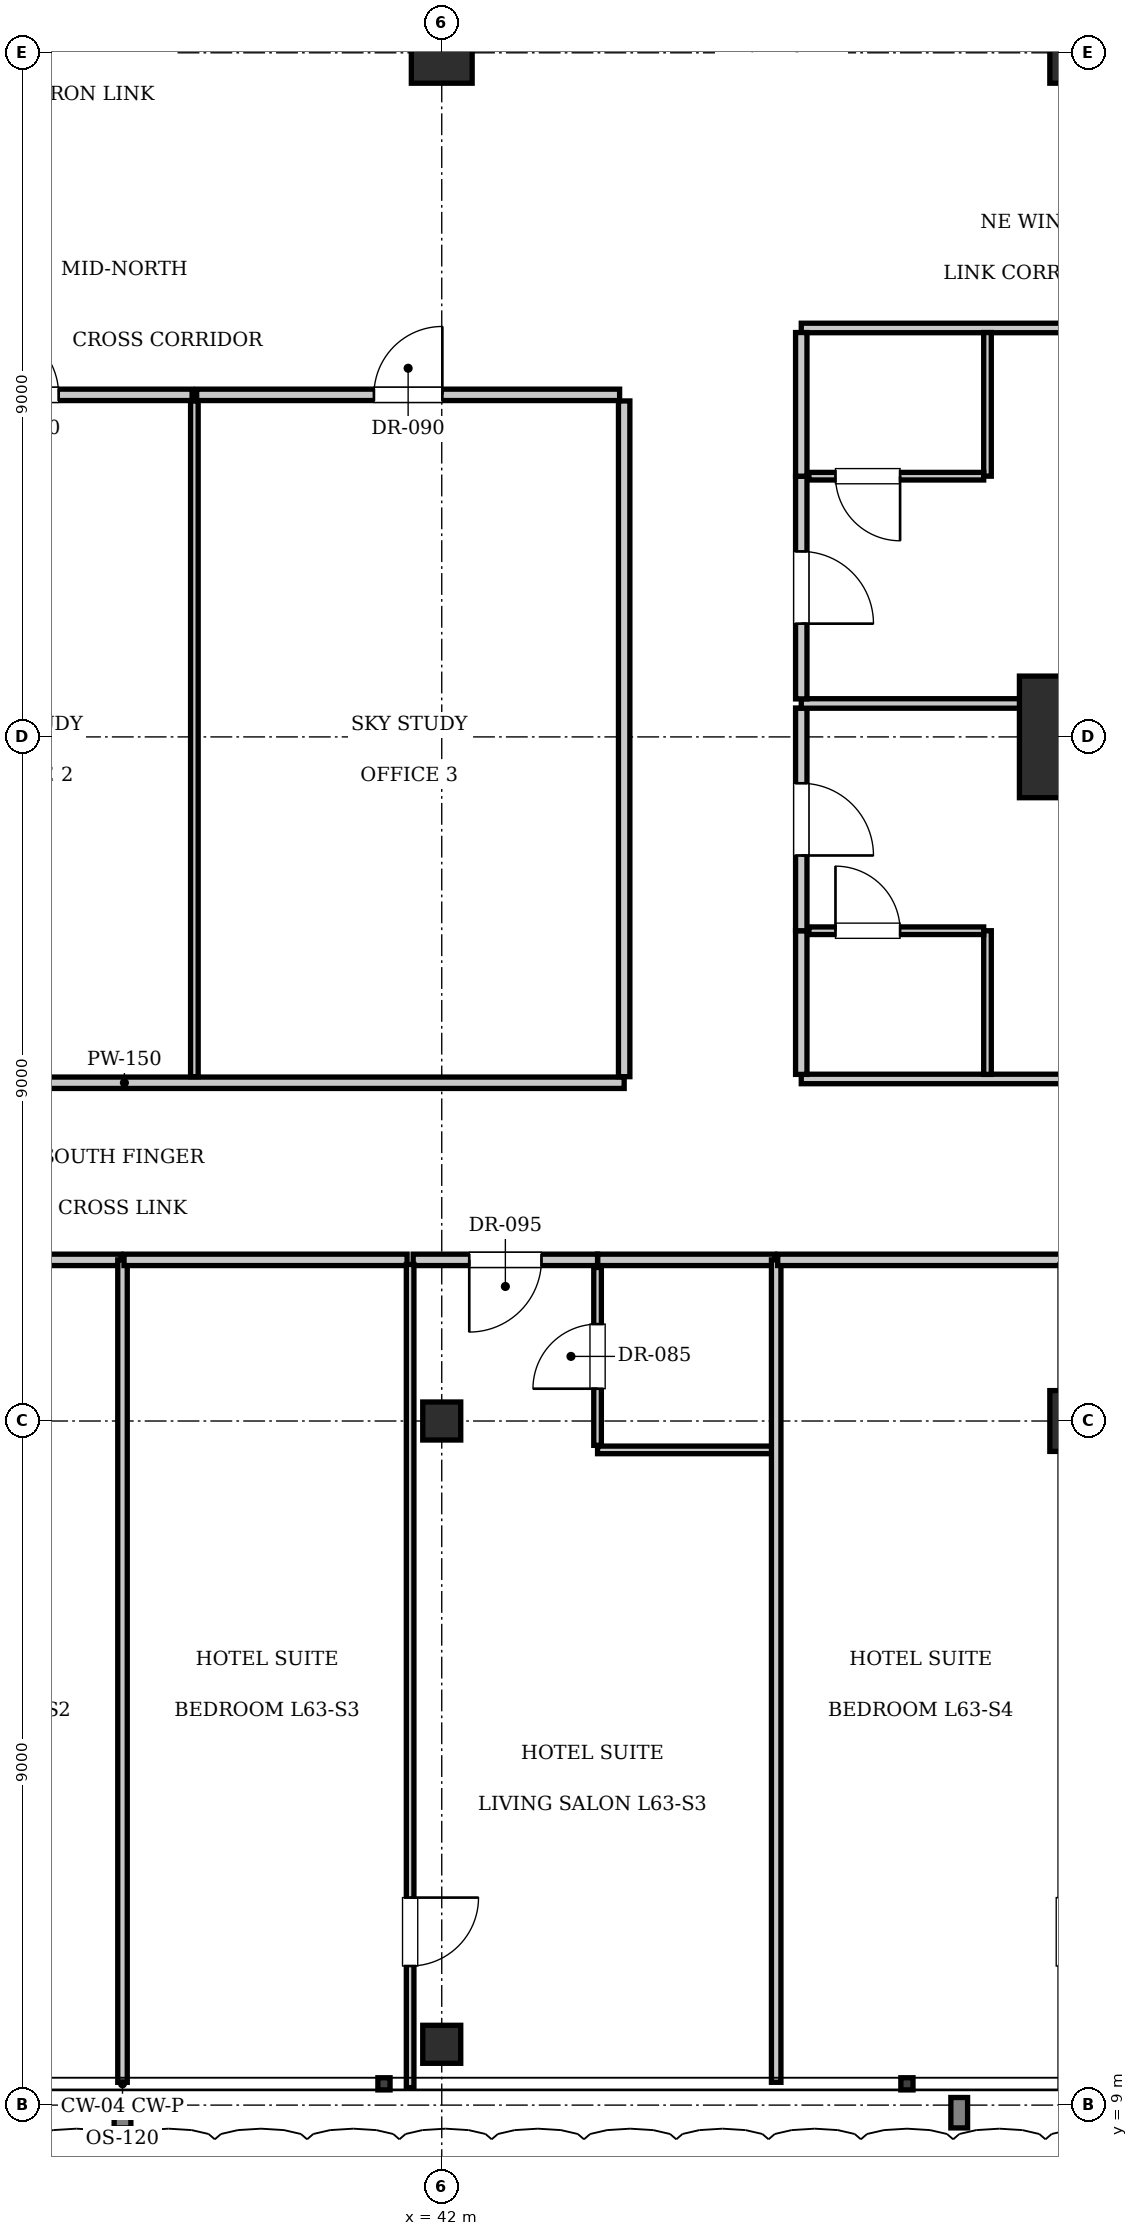
"""IFC4 building model, lengths in metres.
Left out: names, types, materials, properties, quantities, classifications, styles, units other than length and angle.
Written with IfcOpenShell. Run it as: python <this file> out.ifc"""

import sys

from ifc_helpers import new_model, si_unit, direction, frame, frame_2d, origin, origin_2d, place, context, subcontext, project, spatial, rectangle, i_section, extrude, element, fill, save


model = new_model("IFC4")
c1 = context("Model", 3, precision=1e-05, world=origin(), true_north=direction((0.0, 1.0)))
c2 = subcontext(c1, "Body", "Model", "MODEL_VIEW")
j1 = project(units=[si_unit("LENGTHUNIT", "METRE"), si_unit("PLANEANGLEUNIT", "RADIAN")], contexts=[c1])
p1 = place(None, origin())
s1 = spatial("IfcSite", under=j1, at=p1, CompositionType="ELEMENT")
p2 = place(p1, origin())
s2 = spatial("IfcBuilding", under=s1, at=p2, CompositionType="ELEMENT")
p3 = place(p2, frame((0.0, 0.0, 258.65)))
s3 = spatial("IfcBuildingStorey", under=s2, at=p3, CompositionType="ELEMENT", Elevation=258.65)
p4 = place(p3, frame((50.4, 27.0, 0.0), z_axis=(0.0, 0.0, 1.0), x_axis=(1.0, 0.0, 0.0)))
e1 = element("IfcColumn", 1, at=p4, inside=s3, PredefinedType="COLUMN", context=c2, shape_type="SweptSolid", body=[
    extrude(rectangle(XDim=1.6, YDim=1.6, at=origin_2d()), origin(), (0.0, 0.0, 1.0), 3.85),
])
for number, where, z_axis, x_axis in (
    (2, (42.0, 36.0, 0.0), (0.0, 0.0, 1.0), (1.0, 0.0, 0.0)),
    (3, (50.4, 36.0, 0.0), (0.0, 0.0, 1.0), (1.0, 0.0, 0.0)),
    (4, (50.4, 18.0, 0.0), (0.0, 0.0, 1.0), (1.0, 0.0, 0.0)),
):
    element("IfcColumn", number, at=place(p3, frame(where, z_axis=z_axis, x_axis=x_axis)), inside=s3, PredefinedType="COLUMN", context=c2, shape_type="SweptSolid", body=[
        extrude(rectangle(XDim=0.8, YDim=0.8, at=origin_2d()), origin(), (0.0, 0.0, 1.0), 3.85),
    ])
for number, where, z_axis, x_axis in (
    (5, (42.0, 18.0, 0.0), (0.0, 0.0, 1.0), (1.0, 0.0, 0.0)),
    (6, (42.0, 9.8, 0.0), (0.0, 0.0, 1.0), (1.0, 0.0, 0.0)),
):
    element("IfcColumn", number, at=place(p3, frame(where, z_axis=z_axis, x_axis=x_axis)), inside=s3, PredefinedType="COLUMN", context=c2, shape_type="SweptSolid", body=[
        extrude(i_section(OverallWidth=0.5, OverallDepth=0.5, WebThickness=0.022, FlangeThickness=0.032, at=origin_2d()), origin(), (0.0, 0.0, 1.0), 3.85),
    ])
p5 = place(p3, frame((31.25, 22.45, 0.0), z_axis=(0.0, 0.0, 1.0), x_axis=(1.0, 0.0, 0.0)))
e7 = element("IfcWall", 7, at=p5, inside=s3, PredefinedType="PARTITIONING", context=c2, shape_type="SweptSolid", body=[
    extrude(rectangle(XDim=13.15, YDim=0.15, at=frame_2d((6.575, 0.0))), origin(), (0.0, 0.0, 1.0), 3.61),
])
p6 = place(p3, frame((44.4, 22.53, 0.0), z_axis=(0.0, 0.0, 1.0), x_axis=(0.0, 1.0, 0.0)))
e8 = element("IfcWall", 8, at=p6, inside=s3, PredefinedType="PARTITIONING", context=c2, shape_type="SweptSolid", body=[
    extrude(rectangle(XDim=8.89, YDim=0.15, at=frame_2d((4.445, 0.0))), origin(), (0.0, 0.0, 1.0), 3.61),
])
p7 = place(p3, frame((34.304, 31.5, 0.0), z_axis=(0.0, 0.0, 1.0), x_axis=(1.0, 0.0, 0.0)))
e9 = element("IfcWall", 9, at=p7, inside=s3, PredefinedType="PARTITIONING", context=c2, shape_type="SweptSolid", body=[
    extrude(rectangle(XDim=4.411, YDim=0.15, at=frame_2d((2.206, 0.0))), origin(), (0.0, 0.0, 1.0), 3.61),
])
p8 = place(p7, frame((1.756, 0.0, 0.0)))
e10 = element("IfcOpeningElement", 10, at=p8, cuts=e9, PredefinedType="OPENING", context=c2, shape_type="SweptSolid", body=[
    extrude(rectangle(XDim=0.9, YDim=2.1, at=frame_2d((0.45, 1.05))), frame((0.0, 0.085, 0.0), z_axis=(0.0, -1.0, 0.0), x_axis=(1.0, 0.0, 0.0)), (0.0, 0.0, 1.0), 0.17),
])
p9 = place(p3, frame((38.746, 22.53, 0.0), z_axis=(0.0, 0.0, 1.0), x_axis=(0.0, 1.0, 0.0)))
e11 = element("IfcWall", 11, at=p9, inside=s3, PredefinedType="PARTITIONING", context=c2, shape_type="SweptSolid", body=[
    extrude(rectangle(XDim=8.89, YDim=0.1, at=frame_2d((4.445, 0.0))), origin(), (0.0, 0.0, 1.0), 3.61),
])
p10 = place(p3, frame((38.775, 31.5, 0.0), z_axis=(0.0, 0.0, 1.0), x_axis=(1.0, 0.0, 0.0)))
e12 = element("IfcWall", 12, at=p10, inside=s3, PredefinedType="PARTITIONING", context=c2, shape_type="SweptSolid", body=[
    extrude(rectangle(XDim=5.565, YDim=0.15, at=frame_2d((2.782, 0.0))), origin(), (0.0, 0.0, 1.0), 3.61),
])
p11 = place(p10, frame((2.332, 0.0, 0.0)))
e13 = element("IfcOpeningElement", 13, at=p11, cuts=e12, PredefinedType="OPENING", context=c2, shape_type="SweptSolid", body=[
    extrude(rectangle(XDim=0.9, YDim=2.1, at=frame_2d((0.45, 1.05))), frame((0.0, 0.085, 0.0), z_axis=(0.0, -1.0, 0.0), x_axis=(1.0, 0.0, 0.0)), (0.0, 0.0, 1.0), 0.17),
])
p12 = place(p3, frame((34.056, 20.12, 0.0), z_axis=(0.0, 0.0, 1.0), x_axis=(1.0, 0.0, 0.0)))
e14 = element("IfcWall", 14, at=p12, inside=s3, PredefinedType="PARTITIONING", context=c2, shape_type="SweptSolid", body=[
    extrude(rectangle(XDim=3.724, YDim=0.15, at=frame_2d((1.862, 0.0))), origin(), (0.0, 0.0, 1.0), 3.61),
])
p13 = place(p3, frame((37.8, 9.3, 0.0), z_axis=(0.0, 0.0, 1.0), x_axis=(0.0, 1.0, 0.0)))
e15 = element("IfcWall", 15, at=p13, inside=s3, PredefinedType="PARTITIONING", context=c2, shape_type="SweptSolid", body=[
    extrude(rectangle(XDim=10.82, YDim=0.125, at=frame_2d((5.41, 0.0))), origin(), (0.0, 0.0, 1.0), 3.457),
])
p14 = place(p3, frame((44.05, 20.12, 0.0), z_axis=(0.0, 0.0, 1.0), x_axis=(1.0, 0.0, 0.0)))
e16 = element("IfcWall", 16, at=p14, inside=s3, PredefinedType="PARTITIONING", context=c2, shape_type="SweptSolid", body=[
    extrude(rectangle(XDim=2.33, YDim=0.15, at=frame_2d((1.165, 0.0))), origin(), (0.0, 0.0, 1.0), 3.61),
])
p15 = place(p3, frame((44.05, 17.62, 0.0), z_axis=(0.0, 0.0, 1.0), x_axis=(1.0, 0.0, 0.0)))
e17 = element("IfcWall", 17, at=p15, inside=s3, PredefinedType="PARTITIONING", context=c2, shape_type="SweptSolid", body=[
    extrude(rectangle(XDim=2.31, YDim=0.1, at=frame_2d((1.155, 0.0))), origin(), (0.0, 0.0, 1.0), 3.61),
])
p16 = place(p3, frame((44.05, 17.68, 0.0), z_axis=(0.0, 0.0, 1.0), x_axis=(0.0, 1.0, 0.0)))
e18 = element("IfcWall", 18, at=p16, inside=s3, PredefinedType="PARTITIONING", context=c2, shape_type="SweptSolid", body=[
    extrude(rectangle(XDim=2.34, YDim=0.1, at=frame_2d((1.17, 0.0))), origin(), (0.0, 0.0, 1.0), 3.61),
])
p17 = place(p16, frame((0.745, 0.0, 0.0)))
e19 = element("IfcOpeningElement", 19, at=p17, cuts=e18, PredefinedType="OPENING", context=c2, shape_type="SweptSolid", body=[
    extrude(rectangle(XDim=0.85, YDim=2.1, at=frame_2d((0.425, 1.05))), frame((0.0, 0.06, 0.0), z_axis=(0.0, -1.0, 0.0), x_axis=(1.0, 0.0, 0.0)), (0.0, 0.0, 1.0), 0.12),
])
p18 = place(p3, frame((37.82, 20.12, 0.0), z_axis=(0.0, 0.0, 1.0), x_axis=(1.0, 0.0, 0.0)))
e20 = element("IfcWall", 20, at=p18, inside=s3, PredefinedType="PARTITIONING", context=c2, shape_type="SweptSolid", body=[
    extrude(rectangle(XDim=3.724, YDim=0.15, at=frame_2d((1.862, 0.0))), origin(), (0.0, 0.0, 1.0), 3.61),
])
p19 = place(p3, frame((41.624, 20.12, 0.0), z_axis=(0.0, 0.0, 1.0), x_axis=(1.0, 0.0, 0.0)))
e21 = element("IfcWall", 21, at=p19, inside=s3, PredefinedType="PARTITIONING", context=c2, shape_type="SweptSolid", body=[
    extrude(rectangle(XDim=2.426, YDim=0.15, at=frame_2d((1.213, 0.0))), origin(), (0.0, 0.0, 1.0), 3.61),
])
p20 = place(p19, frame((0.738, 0.0, 0.0)))
e22 = element("IfcOpeningElement", 22, at=p20, cuts=e21, PredefinedType="OPENING", context=c2, shape_type="SweptSolid", body=[
    extrude(rectangle(XDim=0.95, YDim=2.15, at=frame_2d((0.475, 1.075))), frame((0.0, 0.085, 0.0), z_axis=(0.0, -1.0, 0.0), x_axis=(1.0, 0.0, 0.0)), (0.0, 0.0, 1.0), 0.17),
])
p21 = place(p3, frame((41.584, 9.23, 0.0), z_axis=(0.0, 0.0, 1.0), x_axis=(0.0, 1.0, 0.0)))
e23 = element("IfcWall", 23, at=p21, inside=s3, PredefinedType="PARTITIONING", context=c2, shape_type="SweptSolid", body=[
    extrude(rectangle(XDim=10.83, YDim=0.1, at=frame_2d((5.415, 0.0))), origin(), (0.0, 0.0, 1.0), 3.61),
])
p22 = place(p21, frame((1.6, 0.0, 0.0)))
e24 = element("IfcOpeningElement", 24, at=p22, cuts=e23, PredefinedType="OPENING", context=c2, shape_type="SweptSolid", body=[
    extrude(rectangle(XDim=0.9, YDim=2.1, at=frame_2d((0.45, 1.05))), frame((0.0, 0.06, 0.0), z_axis=(0.0, -1.0, 0.0), x_axis=(1.0, 0.0, 0.0)), (0.0, 0.0, 1.0), 0.12),
])
p23 = place(p3, frame((46.4, 9.3, 0.0), z_axis=(0.0, 0.0, 1.0), x_axis=(0.0, 1.0, 0.0)))
e25 = element("IfcWall", 25, at=p23, inside=s3, PredefinedType="PARTITIONING", context=c2, shape_type="SweptSolid", body=[
    extrude(rectangle(XDim=10.82, YDim=0.125, at=frame_2d((5.41, 0.0))), origin(), (0.0, 0.0, 1.0), 3.61),
])
p24 = place(p3, frame((46.42, 20.12, 0.0), z_axis=(0.0, 0.0, 1.0), x_axis=(1.0, 0.0, 0.0)))
e26 = element("IfcWall", 26, at=p24, inside=s3, PredefinedType="PARTITIONING", context=c2, shape_type="SweptSolid", body=[
    extrude(rectangle(XDim=3.724, YDim=0.15, at=frame_2d((1.862, 0.0))), origin(), (0.0, 0.0, 1.0), 3.61),
])
for number, where, z_axis, x_axis in (
    (27, (46.73, 22.5, 0.0), (0.0, 0.0, 1.0), (1.0, 0.0, 0.0)),
    (28, (46.73, 32.38, 0.0), (0.0, 0.0, 1.0), (1.0, 0.0, 0.0)),
):
    element("IfcWall", number, at=place(p3, frame(where, z_axis=z_axis, x_axis=x_axis)), inside=s3, PredefinedType="PARTITIONING", context=c2, shape_type="SweptSolid", body=[
        extrude(rectangle(XDim=13.37, YDim=0.125, at=frame_2d((6.685, 0.0))), origin(), (0.0, 0.0, 1.0), 3.61),
    ])
p25 = place(p3, frame((46.73, 22.56, 0.0), z_axis=(0.0, 0.0, 1.0), x_axis=(0.0, 1.0, 0.0)))
e29 = element("IfcWall", 29, at=p25, inside=s3, PredefinedType="PARTITIONING", context=c2, shape_type="SweptSolid", body=[
    extrude(rectangle(XDim=1.89, YDim=0.15, at=frame_2d((0.945, 0.0))), origin(), (0.0, 0.0, 1.0), 3.61),
])
p26 = place(p3, frame((46.73, 24.45, 0.0), z_axis=(0.0, 0.0, 1.0), x_axis=(0.0, 1.0, 0.0)))
e30 = element("IfcWall", 30, at=p26, inside=s3, PredefinedType="PARTITIONING", context=c2, shape_type="SweptSolid", body=[
    extrude(rectangle(XDim=2.93, YDim=0.15, at=frame_2d((1.465, 0.0))), origin(), (0.0, 0.0, 1.0), 3.61),
])
p27 = place(p26, frame((0.99, 0.0, 0.0)))
e31 = element("IfcOpeningElement", 31, at=p27, cuts=e30, PredefinedType="OPENING", context=c2, shape_type="SweptSolid", body=[
    extrude(rectangle(XDim=0.95, YDim=2.15, at=frame_2d((0.475, 1.075))), frame((0.0, 0.085, 0.0), z_axis=(0.0, -1.0, 0.0), x_axis=(1.0, 0.0, 0.0)), (0.0, 0.0, 1.0), 0.17),
])
p28 = place(p3, frame((49.18, 22.56, 0.0), z_axis=(0.0, 0.0, 1.0), x_axis=(0.0, 1.0, 0.0)))
e32 = element("IfcWall", 32, at=p28, inside=s3, PredefinedType="PARTITIONING", context=c2, shape_type="SweptSolid", body=[
    extrude(rectangle(XDim=1.89, YDim=0.1, at=frame_2d((0.945, 0.0))), origin(), (0.0, 0.0, 1.0), 3.61),
])
p29 = place(p3, frame((46.83, 24.45, 0.0), z_axis=(0.0, 0.0, 1.0), x_axis=(1.0, 0.0, 0.0)))
e33 = element("IfcWall", 33, at=p29, inside=s3, PredefinedType="PARTITIONING", context=c2, shape_type="SweptSolid", body=[
    extrude(rectangle(XDim=2.3, YDim=0.1, at=frame_2d((1.15, 0.0))), origin(), (0.0, 0.0, 1.0), 3.61),
])
p30 = place(p29, frame((0.35, 0.0, 0.0)))
e34 = element("IfcOpeningElement", 34, at=p30, cuts=e33, PredefinedType="OPENING", context=c2, shape_type="SweptSolid", body=[
    extrude(rectangle(XDim=0.85, YDim=2.1, at=frame_2d((0.425, 1.05))), frame((0.0, 0.06, 0.0), z_axis=(0.0, -1.0, 0.0), x_axis=(1.0, 0.0, 0.0)), (0.0, 0.0, 1.0), 0.12),
])
p31 = place(p3, frame((46.73, 27.44, 0.0), z_axis=(0.0, 0.0, 1.0), x_axis=(1.0, 0.0, 0.0)))
e35 = element("IfcWall", 35, at=p31, inside=s3, PredefinedType="PARTITIONING", context=c2, shape_type="SweptSolid", body=[
    extrude(rectangle(XDim=13.37, YDim=0.125, at=frame_2d((6.685, 0.0))), origin(), (0.0, 0.0, 1.0), 3.61),
])
p32 = place(p3, frame((46.73, 27.5, 0.0), z_axis=(0.0, 0.0, 1.0), x_axis=(0.0, 1.0, 0.0)))
e36 = element("IfcWall", 36, at=p32, inside=s3, PredefinedType="PARTITIONING", context=c2, shape_type="SweptSolid", body=[
    extrude(rectangle(XDim=2.93, YDim=0.15, at=frame_2d((1.465, 0.0))), origin(), (0.0, 0.0, 1.0), 3.61),
])
p33 = place(p32, frame((0.99, 0.0, 0.0)))
e37 = element("IfcOpeningElement", 37, at=p33, cuts=e36, PredefinedType="OPENING", context=c2, shape_type="SweptSolid", body=[
    extrude(rectangle(XDim=0.95, YDim=2.15, at=frame_2d((0.475, 1.075))), frame((0.0, 0.085, 0.0), z_axis=(0.0, -1.0, 0.0), x_axis=(1.0, 0.0, 0.0)), (0.0, 0.0, 1.0), 0.17),
])
p34 = place(p3, frame((46.73, 30.43, 0.0), z_axis=(0.0, 0.0, 1.0), x_axis=(0.0, 1.0, 0.0)))
e38 = element("IfcWall", 38, at=p34, inside=s3, PredefinedType="PARTITIONING", context=c2, shape_type="SweptSolid", body=[
    extrude(rectangle(XDim=1.89, YDim=0.15, at=frame_2d((0.945, 0.0))), origin(), (0.0, 0.0, 1.0), 3.61),
])
p35 = place(p3, frame((49.18, 30.43, 0.0), z_axis=(0.0, 0.0, 1.0), x_axis=(0.0, 1.0, 0.0)))
e39 = element("IfcWall", 39, at=p35, inside=s3, PredefinedType="PARTITIONING", context=c2, shape_type="SweptSolid", body=[
    extrude(rectangle(XDim=1.89, YDim=0.1, at=frame_2d((0.945, 0.0))), origin(), (0.0, 0.0, 1.0), 3.61),
])
p36 = place(p3, frame((46.83, 30.43, 0.0), z_axis=(0.0, 0.0, 1.0), x_axis=(1.0, 0.0, 0.0)))
e40 = element("IfcWall", 40, at=p36, inside=s3, PredefinedType="PARTITIONING", context=c2, shape_type="SweptSolid", body=[
    extrude(rectangle(XDim=2.3, YDim=0.1, at=frame_2d((1.15, 0.0))), origin(), (0.0, 0.0, 1.0), 3.61),
])
p37 = place(p36, frame((0.35, 0.0, 0.0)))
e41 = element("IfcOpeningElement", 41, at=p37, cuts=e40, PredefinedType="OPENING", context=c2, shape_type="SweptSolid", body=[
    extrude(rectangle(XDim=0.85, YDim=2.1, at=frame_2d((0.425, 1.05))), frame((0.0, 0.06, 0.0), z_axis=(0.0, -1.0, 0.0), x_axis=(1.0, 0.0, 0.0)), (0.0, 0.0, 1.0), 0.12),
])
p38 = place(p8, origin())
e42 = element("IfcDoor", 42, at=p38, inside=s3, OperationType="SINGLE_SWING_LEFT", PredefinedType="DOOR", context=c2, shape_type="SweptSolid", body=[
    extrude(rectangle(XDim=0.9, YDim=2.1, at=frame_2d((0.45, 1.05))), frame((0.0, 0.025, 0.0), z_axis=(0.0, -1.0, 0.0), x_axis=(1.0, 0.0, 0.0)), (0.0, 0.0, 1.0), 0.05),
])
fill(e10, e42)
p39 = place(p11, origin())
e43 = element("IfcDoor", 43, at=p39, inside=s3, OperationType="SINGLE_SWING_RIGHT", PredefinedType="DOOR", context=c2, shape_type="SweptSolid", body=[
    extrude(rectangle(XDim=0.9, YDim=2.1, at=frame_2d((0.45, 1.05))), frame((0.0, 0.025, 0.0), z_axis=(0.0, -1.0, 0.0), x_axis=(1.0, 0.0, 0.0)), (0.0, 0.0, 1.0), 0.05),
])
fill(e13, e43)
p40 = place(p17, origin())
e44 = element("IfcDoor", 44, at=p40, inside=s3, OperationType="SINGLE_SWING_LEFT", PredefinedType="DOOR", context=c2, shape_type="SweptSolid", body=[
    extrude(rectangle(XDim=0.85, YDim=2.1, at=frame_2d((0.425, 1.05))), frame((0.0, 0.025, 0.0), z_axis=(0.0, -1.0, 0.0), x_axis=(1.0, 0.0, 0.0)), (0.0, 0.0, 1.0), 0.05),
])
fill(e19, e44)
p41 = place(p20, frame((0.95, 0.0, 0.0), z_axis=(0.0, 0.0, 1.0), x_axis=(-1.0, 0.0, 0.0)))
e45 = element("IfcDoor", 45, at=p41, inside=s3, OperationType="SINGLE_SWING_RIGHT", PredefinedType="DOOR", context=c2, shape_type="SweptSolid", body=[
    extrude(rectangle(XDim=0.95, YDim=2.15, at=frame_2d((0.475, 1.075))), frame((0.0, 0.025, 0.0), z_axis=(0.0, -1.0, 0.0), x_axis=(1.0, 0.0, 0.0)), (0.0, 0.0, 1.0), 0.05),
])
fill(e22, e45)
p42 = place(p22, frame((0.9, 0.0, 0.0), z_axis=(0.0, 0.0, 1.0), x_axis=(-1.0, 0.0, 0.0)))
e46 = element("IfcDoor", 46, at=p42, inside=s3, OperationType="SINGLE_SWING_LEFT", PredefinedType="DOOR", context=c2, shape_type="SweptSolid", body=[
    extrude(rectangle(XDim=0.9, YDim=2.1, at=frame_2d((0.45, 1.05))), frame((0.0, 0.025, 0.0), z_axis=(0.0, -1.0, 0.0), x_axis=(1.0, 0.0, 0.0)), (0.0, 0.0, 1.0), 0.05),
])
fill(e24, e46)
p43 = place(p30, origin())
e47 = element("IfcDoor", 47, at=p43, inside=s3, OperationType="SINGLE_SWING_LEFT", PredefinedType="DOOR", context=c2, shape_type="SweptSolid", body=[
    extrude(rectangle(XDim=0.85, YDim=2.1, at=frame_2d((0.425, 1.05))), frame((0.0, 0.025, 0.0), z_axis=(0.0, -1.0, 0.0), x_axis=(1.0, 0.0, 0.0)), (0.0, 0.0, 1.0), 0.05),
])
fill(e34, e47)
p44 = place(p27, frame((0.95, 0.0, 0.0), z_axis=(0.0, 0.0, 1.0), x_axis=(-1.0, 0.0, 0.0)))
e48 = element("IfcDoor", 48, at=p44, inside=s3, OperationType="SINGLE_SWING_RIGHT", PredefinedType="DOOR", context=c2, shape_type="SweptSolid", body=[
    extrude(rectangle(XDim=0.95, YDim=2.15, at=frame_2d((0.475, 1.075))), frame((0.0, 0.025, 0.0), z_axis=(0.0, -1.0, 0.0), x_axis=(1.0, 0.0, 0.0)), (0.0, 0.0, 1.0), 0.05),
])
fill(e31, e48)
p45 = place(p37, frame((0.85, 0.0, 0.0), z_axis=(0.0, 0.0, 1.0), x_axis=(-1.0, 0.0, 0.0)))
e49 = element("IfcDoor", 49, at=p45, inside=s3, OperationType="SINGLE_SWING_LEFT", PredefinedType="DOOR", context=c2, shape_type="SweptSolid", body=[
    extrude(rectangle(XDim=0.85, YDim=2.1, at=frame_2d((0.425, 1.05))), frame((0.0, 0.025, 0.0), z_axis=(0.0, -1.0, 0.0), x_axis=(1.0, 0.0, 0.0)), (0.0, 0.0, 1.0), 0.05),
])
fill(e41, e49)
p46 = place(p33, frame((0.95, 0.0, 0.0), z_axis=(0.0, 0.0, 1.0), x_axis=(-1.0, 0.0, 0.0)))
e50 = element("IfcDoor", 50, at=p46, inside=s3, OperationType="SINGLE_SWING_RIGHT", PredefinedType="DOOR", context=c2, shape_type="SweptSolid", body=[
    extrude(rectangle(XDim=0.95, YDim=2.15, at=frame_2d((0.475, 1.075))), frame((0.0, 0.025, 0.0), z_axis=(0.0, -1.0, 0.0), x_axis=(1.0, 0.0, 0.0)), (0.0, 0.0, 1.0), 0.05),
])
fill(e37, e50)
save(model, sys.argv[1])
